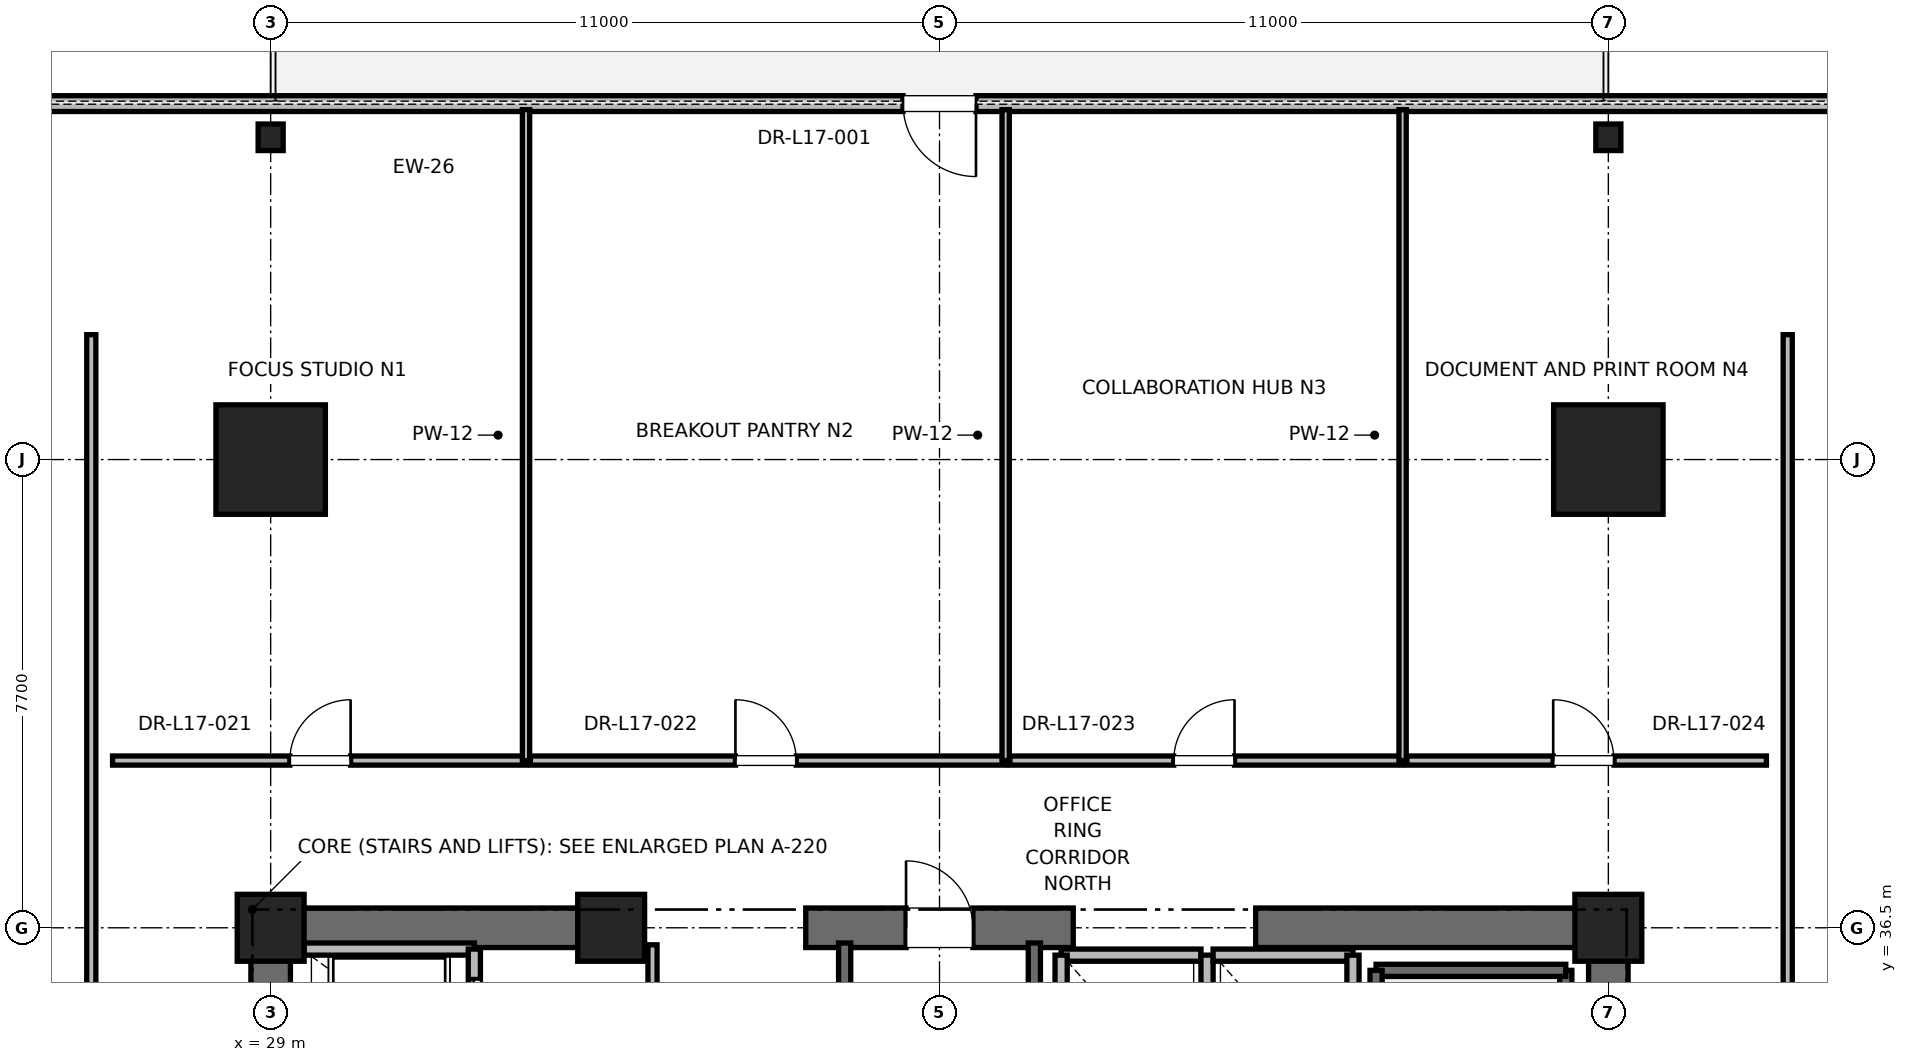
"""IFC4 building model, lengths in metres.
Left out: names, types, materials, properties, quantities, classifications, styles, units other than length and angle.
Written with IfcOpenShell. Run it as: python <this file> out.ifc"""

import sys

from ifc_helpers import new_model, si_unit, direction, frame, frame_2d, origin, origin_2d, place, context, subcontext, project, spatial, rectangle, i_section, extrude, element, fill, save


model = new_model("IFC4")
c1 = context("Model", 3, precision=1e-05, world=origin(), true_north=direction((0.0, 1.0)))
c2 = subcontext(c1, "Body", "Model", "MODEL_VIEW")
j1 = project(units=[si_unit("LENGTHUNIT", "METRE"), si_unit("PLANEANGLEUNIT", "RADIAN")], contexts=[c1])
p1 = place(None, origin())
s1 = spatial("IfcSite", under=j1, at=p1, CompositionType="ELEMENT")
p2 = place(p1, origin())
s2 = spatial("IfcBuilding", under=s1, at=p2, CompositionType="ELEMENT")
p3 = place(p2, frame((0.0, 0.0, 75.6)))
s3 = spatial("IfcBuildingStorey", under=s2, at=p3, CompositionType="ELEMENT", Elevation=75.6)
for number, where, z_axis, x_axis in (
    (1, (29.0, 44.2, 0.0), (0.0, 0.0, 1.0), (1.0, 0.0, 0.0)),
    (2, (51.0, 44.2, 0.0), (0.0, 0.0, 1.0), (1.0, 0.0, 0.0)),
):
    element("IfcColumn", number, at=place(p3, frame(where, z_axis=z_axis, x_axis=x_axis)), inside=s3, PredefinedType="COLUMN", context=c2, shape_type="SweptSolid", body=[
        extrude(rectangle(XDim=1.8, YDim=1.8, at=origin_2d()), origin(), (0.0, 0.0, 1.0), 4.0),
    ])
for number, where, z_axis, x_axis in (
    (3, (29.0, 49.5, 0.0), (0.0, 0.0, 1.0), (1.0, 0.0, 0.0)),
    (4, (51.0, 49.5, 0.0), (0.0, 0.0, 1.0), (1.0, 0.0, 0.0)),
):
    element("IfcColumn", number, at=place(p3, frame(where, z_axis=z_axis, x_axis=x_axis)), inside=s3, PredefinedType="COLUMN", context=c2, shape_type="SweptSolid", body=[
        extrude(i_section(OverallWidth=0.412, OverallDepth=0.437, WebThickness=0.036, FlangeThickness=0.058, FilletRadius=0.015, at=origin_2d()), origin(), (0.0, 0.0, 1.0), 4.0),
    ])
for number, where, z_axis, x_axis in (
    (5, (29.0, 36.5, 0.0), (0.0, 0.0, 1.0), (1.0, 0.0, 0.0)),
    (6, (51.0, 36.5, 0.0), (0.0, 0.0, 1.0), (1.0, 0.0, 0.0)),
    (7, (34.6, 36.5, 0.0), (0.0, 0.0, 1.0), (1.0, 0.0, 0.0)),
):
    element("IfcColumn", number, at=place(p3, frame(where, z_axis=z_axis, x_axis=x_axis)), inside=s3, PredefinedType="PILASTER", context=c2, shape_type="SweptSolid", body=[
        extrude(rectangle(XDim=1.1, YDim=1.1, at=origin_2d()), origin(), (0.0, 0.0, 1.0), 4.0),
    ])
p4 = place(p3, frame((29.0, 36.5, 0.0), z_axis=(0.0, 0.0, 1.0), x_axis=(1.0, 0.0, 0.0)))
e8 = element("IfcWall", 8, at=p4, inside=s3, PredefinedType="SHEAR", context=c2, shape_type="SweptSolid", body=[
    extrude(rectangle(XDim=5.8, YDim=0.65, at=frame_2d((2.9, 0.0))), origin(), (0.0, 0.0, 1.0), 3.76),
])
p5 = place(p3, frame((37.8, 36.5, 0.0), z_axis=(0.0, 0.0, 1.0), x_axis=(1.0, 0.0, 0.0)))
e9 = element("IfcWall", 9, at=p5, inside=s3, PredefinedType="SHEAR", context=c2, shape_type="SweptSolid", body=[
    extrude(rectangle(XDim=4.4, YDim=0.65, at=frame_2d((2.2, 0.0))), origin(), (0.0, 0.0, 1.0), 3.76),
])
p6 = place(p5, frame((1.65, 0.0, 0.0)))
e10 = element("IfcOpeningElement", 10, at=p6, cuts=e9, PredefinedType="OPENING", context=c2, shape_type="SweptSolid", body=[
    extrude(rectangle(XDim=1.1, YDim=2.15, at=frame_2d((0.55, 1.075))), frame((0.0, 0.325, 0.0), z_axis=(0.0, -1.0, 0.0), x_axis=(1.0, 0.0, 0.0)), (0.0, 0.0, 1.0), 0.65),
])
for number, where, z_axis, x_axis in (
    (11, (45.2, 36.5, 0.0), (0.0, 0.0, 1.0), (1.0, 0.0, 0.0)),
    (12, (29.0, 30.7, 0.0), (0.0, 0.0, 1.0), (0.0, 1.0, 0.0)),
):
    element("IfcWall", number, at=place(p3, frame(where, z_axis=z_axis, x_axis=x_axis)), inside=s3, PredefinedType="SHEAR", context=c2, shape_type="SweptSolid", body=[
        extrude(rectangle(XDim=5.8, YDim=0.65, at=frame_2d((2.9, 0.0))), origin(), (0.0, 0.0, 1.0), 3.76),
    ])
p7 = place(p3, frame((51.0, 27.7, 0.0), z_axis=(0.0, 0.0, 1.0), x_axis=(0.0, 1.0, 0.0)))
e13 = element("IfcWall", 13, at=p7, inside=s3, PredefinedType="SHEAR", context=c2, shape_type="SweptSolid", body=[
    extrude(rectangle(XDim=8.8, YDim=0.65, at=frame_2d((4.4, 0.0))), origin(), (0.0, 0.0, 1.0), 3.76),
])
p8 = place(p3, frame((62.362, 50.054, 0.0), z_axis=(0.0, 0.0, 1.0), x_axis=(-1.0, 0.0, 0.0)))
e14 = element("IfcWall", 14, at=p8, inside=s3, PredefinedType="PARAPET", context=c2, shape_type="SweptSolid", body=[
    extrude(rectangle(XDim=44.725, YDim=0.26, at=frame_2d((22.362, 0.0))), origin(), (0.0, 0.0, 1.0), 2.889),
])
p9 = place(p8, frame((4.2, 0.0, 0.85)))
e15 = element("IfcOpeningElement", 15, at=p9, cuts=e14, PredefinedType="OPENING", context=c2, shape_type="SweptSolid", body=[
    extrude(rectangle(XDim=1.8, YDim=2.2, at=frame_2d((0.9, 1.1))), frame((0.0, 0.13, 0.0), z_axis=(0.0, -1.0, 0.0), x_axis=(1.0, 0.0, 0.0)), (0.0, 0.0, 1.0), 0.26),
])
p10 = place(p8, frame((21.762, 0.0, 0.0)))
e16 = element("IfcOpeningElement", 16, at=p10, cuts=e14, PredefinedType="OPENING", context=c2, shape_type="SweptSolid", body=[
    extrude(rectangle(XDim=1.2, YDim=2.2, at=frame_2d((0.6, 1.1))), frame((0.0, 0.13, 0.0), z_axis=(0.0, -1.0, 0.0), x_axis=(1.0, 0.0, 0.0)), (0.0, 0.0, 1.0), 0.26),
])
p11 = place(p8, frame((38.725, 0.0, 0.85)))
e17 = element("IfcOpeningElement", 17, at=p11, cuts=e14, PredefinedType="OPENING", context=c2, shape_type="SweptSolid", body=[
    extrude(rectangle(XDim=1.8, YDim=2.2, at=frame_2d((0.9, 1.1))), frame((0.0, 0.13, 0.0), z_axis=(0.0, -1.0, 0.0), x_axis=(1.0, 0.0, 0.0)), (0.0, 0.0, 1.0), 0.26),
])
p12 = place(p3, frame((50.3, 27.65, 0.0), z_axis=(0.0, 0.0, 1.0), x_axis=(0.0, 1.0, 0.0)))
e18 = element("IfcWall", 18, at=p12, inside=s3, PredefinedType="SOLIDWALL", context=c2, shape_type="SweptSolid", body=[
    extrude(rectangle(XDim=8.15, YDim=0.2, at=frame_2d((4.075, 0.0))), origin(), (0.0, 0.0, 1.0), 3.76),
])
p13 = place(p3, frame((47.18, 35.8, 0.0), z_axis=(0.0, 0.0, 1.0), x_axis=(1.0, 0.0, 0.0)))
e19 = element("IfcWall", 19, at=p13, inside=s3, PredefinedType="SOLIDWALL", context=c2, shape_type="SweptSolid", body=[
    extrude(rectangle(XDim=3.12, YDim=0.2, at=frame_2d((1.56, 0.0))), origin(), (0.0, 0.0, 1.0), 3.76),
])
p14 = place(p3, frame((47.18, 27.62, 0.0), z_axis=(0.0, 0.0, 1.0), x_axis=(0.0, 1.0, 0.0)))
e20 = element("IfcWall", 20, at=p14, inside=s3, PredefinedType="SOLIDWALL", context=c2, shape_type="SweptSolid", body=[
    extrude(rectangle(XDim=8.18, YDim=0.2, at=frame_2d((4.09, 0.0))), origin(), (0.0, 0.0, 1.0), 3.76),
])
p15 = place(p3, frame((38.44, 27.38, 0.0), z_axis=(0.0, 0.0, 1.0), x_axis=(0.0, 1.0, 0.0)))
e21 = element("IfcWall", 21, at=p15, inside=s3, PredefinedType="SOLIDWALL", context=c2, shape_type="SweptSolid", body=[
    extrude(rectangle(XDim=8.87, YDim=0.2, at=frame_2d((4.435, 0.0))), origin(), (0.0, 0.0, 1.0), 3.76),
])
p16 = place(p3, frame((41.56, 27.68, 0.0), z_axis=(0.0, 0.0, 1.0), x_axis=(0.0, 1.0, 0.0)))
e22 = element("IfcWall", 22, at=p16, inside=s3, PredefinedType="SOLIDWALL", context=c2, shape_type="SweptSolid", body=[
    extrude(rectangle(XDim=8.57, YDim=0.2, at=frame_2d((4.285, 0.0))), origin(), (0.0, 0.0, 1.0), 3.76),
])
p17 = place(p3, frame((32.35, 36.15, 0.0), z_axis=(0.0, 0.0, 1.0), x_axis=(-1.0, 0.0, 0.0)))
e23 = element("IfcWall", 23, at=p17, inside=s3, PredefinedType="SOLIDWALL", context=c2, shape_type="SweptSolid", body=[
    extrude(rectangle(XDim=2.8, YDim=0.2, at=frame_2d((1.4, 0.0))), origin(), (0.0, 0.0, 1.0), 2.889),
])
p18 = place(p3, frame((32.35, 34.05, 0.0), z_axis=(0.0, 0.0, 1.0), x_axis=(0.0, 1.0, 0.0)))
e24 = element("IfcWall", 24, at=p18, inside=s3, PredefinedType="SOLIDWALL", context=c2, shape_type="SweptSolid", body=[
    extrude(rectangle(XDim=2.1, YDim=0.2, at=frame_2d((1.05, 0.0))), origin(), (0.0, 0.0, 1.0), 3.76),
])
p19 = place(p18, frame((0.5, 0.0, 0.0)))
e25 = element("IfcOpeningElement", 25, at=p19, cuts=e24, PredefinedType="OPENING", context=c2, shape_type="SweptSolid", body=[
    extrude(rectangle(XDim=1.1, YDim=2.2, at=frame_2d((0.55, 1.1))), frame((0.0, 0.1, 0.0), z_axis=(0.0, -1.0, 0.0), x_axis=(1.0, 0.0, 0.0)), (0.0, 0.0, 1.0), 0.2),
])
p20 = place(p3, frame((44.3, 36.05, 0.0), z_axis=(0.0, 0.0, 1.0), x_axis=(-1.0, 0.0, 0.0)))
e26 = element("IfcWall", 26, at=p20, inside=s3, PredefinedType="SOLIDWALL", context=c2, shape_type="SweptSolid", body=[
    extrude(rectangle(XDim=2.3, YDim=0.2, at=frame_2d((1.15, 0.0))), origin(), (0.0, 0.0, 1.0), 2.54),
])
for number, where, z_axis, x_axis in (
    (27, (42.0, 36.05, 0.0), (0.0, 0.0, 1.0), (0.0, -1.0, 0.0)),
    (28, (44.4, 33.45, 0.0), (0.0, 0.0, 1.0), (0.0, 1.0, 0.0)),
):
    element("IfcWall", number, at=place(p3, frame(where, z_axis=z_axis, x_axis=x_axis)), inside=s3, PredefinedType="SOLIDWALL", context=c2, shape_type="SweptSolid", body=[
        extrude(rectangle(XDim=2.6, YDim=0.2, at=frame_2d((1.3, 0.0))), origin(), (0.0, 0.0, 1.0), 2.54),
    ])
p21 = place(p3, frame((46.8, 36.05, 0.0), z_axis=(0.0, 0.0, 1.0), x_axis=(-1.0, 0.0, 0.0)))
e29 = element("IfcWall", 29, at=p21, inside=s3, PredefinedType="SOLIDWALL", context=c2, shape_type="SweptSolid", body=[
    extrude(rectangle(XDim=2.3, YDim=0.2, at=frame_2d((1.15, 0.0))), origin(), (0.0, 0.0, 1.0), 2.54),
])
p22 = place(p3, frame((46.8, 33.45, 0.0), z_axis=(0.0, 0.0, 1.0), x_axis=(0.0, 1.0, 0.0)))
e30 = element("IfcWall", 30, at=p22, inside=s3, PredefinedType="SOLIDWALL", context=c2, shape_type="SweptSolid", body=[
    extrude(rectangle(XDim=2.6, YDim=0.2, at=frame_2d((1.3, 0.0))), origin(), (0.0, 0.0, 1.0), 3.76),
])
p23 = place(p3, frame((35.28, 33.95, 0.0), z_axis=(0.0, 0.0, 1.0), x_axis=(0.0, 1.0, 0.0)))
e31 = element("IfcWall", 31, at=p23, inside=s3, PredefinedType="PARTITIONING", context=c2, shape_type="SweptSolid", body=[
    extrude(rectangle(XDim=2.27, YDim=0.15, at=frame_2d((1.135, 0.0))), origin(), (0.0, 0.0, 1.0), 2.54),
])
p24 = place(p23, frame((0.66, 0.0, 0.0)))
e32 = element("IfcOpeningElement", 32, at=p24, cuts=e31, PredefinedType="OPENING", context=c2, shape_type="SweptSolid", body=[
    extrude(rectangle(XDim=0.95, YDim=2.15, at=frame_2d((0.475, 1.075))), frame((0.0, 0.075, 0.0), z_axis=(0.0, -1.0, 0.0), x_axis=(1.0, 0.0, 0.0)), (0.0, 0.0, 1.0), 0.15),
])
p25 = place(p3, frame((26.4, 39.25, 0.0), z_axis=(0.0, 0.0, 1.0), x_axis=(1.0, 0.0, 0.0)))
e33 = element("IfcWall", 33, at=p25, inside=s3, PredefinedType="PARTITIONING", context=c2, shape_type="SweptSolid", body=[
    extrude(rectangle(XDim=6.8, YDim=0.15, at=frame_2d((3.4, 0.0))), origin(), (0.0, 0.0, 1.0), 2.85),
])
p26 = place(p25, frame((2.915, 0.0, 0.0)))
e34 = element("IfcOpeningElement", 34, at=p26, cuts=e33, PredefinedType="OPENING", context=c2, shape_type="SweptSolid", body=[
    extrude(rectangle(XDim=1.0, YDim=2.15, at=frame_2d((0.5, 1.075))), frame((0.0, 0.075, 0.0), z_axis=(0.0, -1.0, 0.0), x_axis=(1.0, 0.0, 0.0)), (0.0, 0.0, 1.0), 0.15),
])
p27 = place(p3, frame((33.2, 39.25, 0.0), z_axis=(0.0, 0.0, 1.0), x_axis=(0.0, 1.0, 0.0)))
e35 = element("IfcWall", 35, at=p27, inside=s3, PredefinedType="PARTITIONING", context=c2, shape_type="SweptSolid", body=[
    extrude(rectangle(XDim=10.704, YDim=0.12, at=frame_2d((5.352, 0.0))), origin(), (0.0, 0.0, 1.0), 2.39),
])
p28 = place(p3, frame((33.27, 39.25, 0.0), z_axis=(0.0, 0.0, 1.0), x_axis=(1.0, 0.0, 0.0)))
e36 = element("IfcWall", 36, at=p28, inside=s3, PredefinedType="PARTITIONING", context=c2, shape_type="SweptSolid", body=[
    extrude(rectangle(XDim=7.818, YDim=0.15, at=frame_2d((3.909, 0.0))), origin(), (0.0, 0.0, 1.0), 2.85),
])
p29 = place(p28, frame((3.374, 0.0, 0.0)))
e37 = element("IfcOpeningElement", 37, at=p29, cuts=e36, PredefinedType="OPENING", context=c2, shape_type="SweptSolid", body=[
    extrude(rectangle(XDim=1.0, YDim=2.15, at=frame_2d((0.5, 1.075))), frame((0.0, 0.075, 0.0), z_axis=(0.0, -1.0, 0.0), x_axis=(1.0, 0.0, 0.0)), (0.0, 0.0, 1.0), 0.15),
])
p30 = place(p3, frame((41.088, 39.25, 0.0), z_axis=(0.0, 0.0, 1.0), x_axis=(0.0, 1.0, 0.0)))
e38 = element("IfcWall", 38, at=p30, inside=s3, PredefinedType="PARTITIONING", context=c2, shape_type="SweptSolid", body=[
    extrude(rectangle(XDim=10.704, YDim=0.12, at=frame_2d((5.352, 0.0))), origin(), (0.0, 0.0, 1.0), 2.39),
])
p31 = place(p3, frame((41.158, 39.25, 0.0), z_axis=(0.0, 0.0, 1.0), x_axis=(1.0, 0.0, 0.0)))
e39 = element("IfcWall", 39, at=p31, inside=s3, PredefinedType="PARTITIONING", context=c2, shape_type="SweptSolid", body=[
    extrude(rectangle(XDim=6.458, YDim=0.15, at=frame_2d((3.229, 0.0))), origin(), (0.0, 0.0, 1.0), 2.85),
])
p32 = place(p31, frame((2.694, 0.0, 0.0)))
e40 = element("IfcOpeningElement", 40, at=p32, cuts=e39, PredefinedType="OPENING", context=c2, shape_type="SweptSolid", body=[
    extrude(rectangle(XDim=1.0, YDim=2.15, at=frame_2d((0.5, 1.075))), frame((0.0, 0.075, 0.0), z_axis=(0.0, -1.0, 0.0), x_axis=(1.0, 0.0, 0.0)), (0.0, 0.0, 1.0), 0.15),
])
p33 = place(p3, frame((47.616, 39.25, 0.0), z_axis=(0.0, 0.0, 1.0), x_axis=(0.0, 1.0, 0.0)))
e41 = element("IfcWall", 41, at=p33, inside=s3, PredefinedType="PARTITIONING", context=c2, shape_type="SweptSolid", body=[
    extrude(rectangle(XDim=10.704, YDim=0.12, at=frame_2d((5.352, 0.0))), origin(), (0.0, 0.0, 1.0), 2.39),
])
p34 = place(p3, frame((47.686, 39.25, 0.0), z_axis=(0.0, 0.0, 1.0), x_axis=(1.0, 0.0, 0.0)))
e42 = element("IfcWall", 42, at=p34, inside=s3, PredefinedType="PARTITIONING", context=c2, shape_type="SweptSolid", body=[
    extrude(rectangle(XDim=5.914, YDim=0.15, at=frame_2d((2.957, 0.0))), origin(), (0.0, 0.0, 1.0), 2.85),
])
p35 = place(p34, frame((2.407, 0.0, 0.0)))
e43 = element("IfcOpeningElement", 43, at=p35, cuts=e42, PredefinedType="OPENING", context=c2, shape_type="SweptSolid", body=[
    extrude(rectangle(XDim=1.0, YDim=2.15, at=frame_2d((0.5, 1.075))), frame((0.0, 0.075, 0.0), z_axis=(0.0, -1.0, 0.0), x_axis=(1.0, 0.0, 0.0)), (0.0, 0.0, 1.0), 0.15),
])
p36 = place(p3, frame((26.05, 8.746, 0.0), z_axis=(0.0, 0.0, 1.0), x_axis=(0.0, 1.0, 0.0)))
e44 = element("IfcWall", 44, at=p36, inside=s3, PredefinedType="PARTITIONING", context=c2, shape_type="SweptSolid", body=[
    extrude(rectangle(XDim=37.507, YDim=0.15, at=frame_2d((18.754, 0.0))), origin(), (0.0, 0.0, 1.0), 2.85),
])
p37 = place(p36, frame((18.254, 0.0, 0.0)))
e45 = element("IfcOpeningElement", 45, at=p37, cuts=e44, PredefinedType="OPENING", context=c2, shape_type="SweptSolid", body=[
    extrude(rectangle(XDim=1.0, YDim=2.15, at=frame_2d((0.5, 1.075))), frame((0.0, 0.075, 0.0), z_axis=(0.0, -1.0, 0.0), x_axis=(1.0, 0.0, 0.0)), (0.0, 0.0, 1.0), 0.15),
])
p38 = place(p3, frame((53.95, 29.82, 0.0), z_axis=(0.0, 0.0, 1.0), x_axis=(0.0, 1.0, 0.0)))
e46 = element("IfcWall", 46, at=p38, inside=s3, PredefinedType="PARTITIONING", context=c2, shape_type="SweptSolid", body=[
    extrude(rectangle(XDim=16.433, YDim=0.15, at=frame_2d((8.217, 0.0))), origin(), (0.0, 0.0, 1.0), 2.85),
])
p39 = place(p38, frame((2.79, 0.0, 0.0)))
e47 = element("IfcOpeningElement", 47, at=p39, cuts=e46, PredefinedType="OPENING", context=c2, shape_type="SweptSolid", body=[
    extrude(rectangle(XDim=1.0, YDim=2.15, at=frame_2d((0.5, 1.075))), frame((0.0, 0.075, 0.0), z_axis=(0.0, -1.0, 0.0), x_axis=(1.0, 0.0, 0.0)), (0.0, 0.0, 1.0), 0.15),
])
p40 = place(p10, origin())
e48 = element("IfcDoor", 48, at=p40, inside=s3, OperationType="SINGLE_SWING_LEFT", PredefinedType="DOOR", context=c2, shape_type="SweptSolid", body=[
    extrude(rectangle(XDim=1.2, YDim=2.2, at=frame_2d((0.6, 1.1))), frame((0.0, 0.025, 0.0), z_axis=(0.0, -1.0, 0.0), x_axis=(1.0, 0.0, 0.0)), (0.0, 0.0, 1.0), 0.05),
])
fill(e16, e48)
p41 = place(p6, origin())
e49 = element("IfcDoor", 49, at=p41, inside=s3, OperationType="SINGLE_SWING_LEFT", PredefinedType="DOOR", context=c2, shape_type="SweptSolid", body=[
    extrude(rectangle(XDim=1.1, YDim=2.15, at=frame_2d((0.55, 1.075))), frame((0.0, 0.025, 0.0), z_axis=(0.0, -1.0, 0.0), x_axis=(1.0, 0.0, 0.0)), (0.0, 0.0, 1.0), 0.05),
])
fill(e10, e49)
p42 = place(p19, origin())
e50 = element("IfcDoor", 50, at=p42, inside=s3, OperationType="SLIDING_TO_RIGHT", PredefinedType="DOOR", context=c2, shape_type="SweptSolid", body=[
    extrude(rectangle(XDim=1.1, YDim=2.2, at=frame_2d((0.55, 1.1))), frame((0.0, 0.025, 0.0), z_axis=(0.0, -1.0, 0.0), x_axis=(1.0, 0.0, 0.0)), (0.0, 0.0, 1.0), 0.05),
])
fill(e25, e50)
p43 = place(p26, origin())
e51 = element("IfcDoor", 51, at=p43, inside=s3, OperationType="SINGLE_SWING_RIGHT", PredefinedType="DOOR", context=c2, shape_type="SweptSolid", body=[
    extrude(rectangle(XDim=1.0, YDim=2.15, at=frame_2d((0.5, 1.075))), frame((0.0, 0.025, 0.0), z_axis=(0.0, -1.0, 0.0), x_axis=(1.0, 0.0, 0.0)), (0.0, 0.0, 1.0), 0.05),
])
fill(e34, e51)
p44 = place(p29, origin())
e52 = element("IfcDoor", 52, at=p44, inside=s3, OperationType="SINGLE_SWING_LEFT", PredefinedType="DOOR", context=c2, shape_type="SweptSolid", body=[
    extrude(rectangle(XDim=1.0, YDim=2.15, at=frame_2d((0.5, 1.075))), frame((0.0, 0.025, 0.0), z_axis=(0.0, -1.0, 0.0), x_axis=(1.0, 0.0, 0.0)), (0.0, 0.0, 1.0), 0.05),
])
fill(e37, e52)
p45 = place(p32, origin())
e53 = element("IfcDoor", 53, at=p45, inside=s3, OperationType="SINGLE_SWING_RIGHT", PredefinedType="DOOR", context=c2, shape_type="SweptSolid", body=[
    extrude(rectangle(XDim=1.0, YDim=2.15, at=frame_2d((0.5, 1.075))), frame((0.0, 0.025, 0.0), z_axis=(0.0, -1.0, 0.0), x_axis=(1.0, 0.0, 0.0)), (0.0, 0.0, 1.0), 0.05),
])
fill(e40, e53)
p46 = place(p35, origin())
e54 = element("IfcDoor", 54, at=p46, inside=s3, OperationType="SINGLE_SWING_LEFT", PredefinedType="DOOR", context=c2, shape_type="SweptSolid", body=[
    extrude(rectangle(XDim=1.0, YDim=2.15, at=frame_2d((0.5, 1.075))), frame((0.0, 0.025, 0.0), z_axis=(0.0, -1.0, 0.0), x_axis=(1.0, 0.0, 0.0)), (0.0, 0.0, 1.0), 0.05),
])
fill(e43, e54)
save(model, sys.argv[1])
